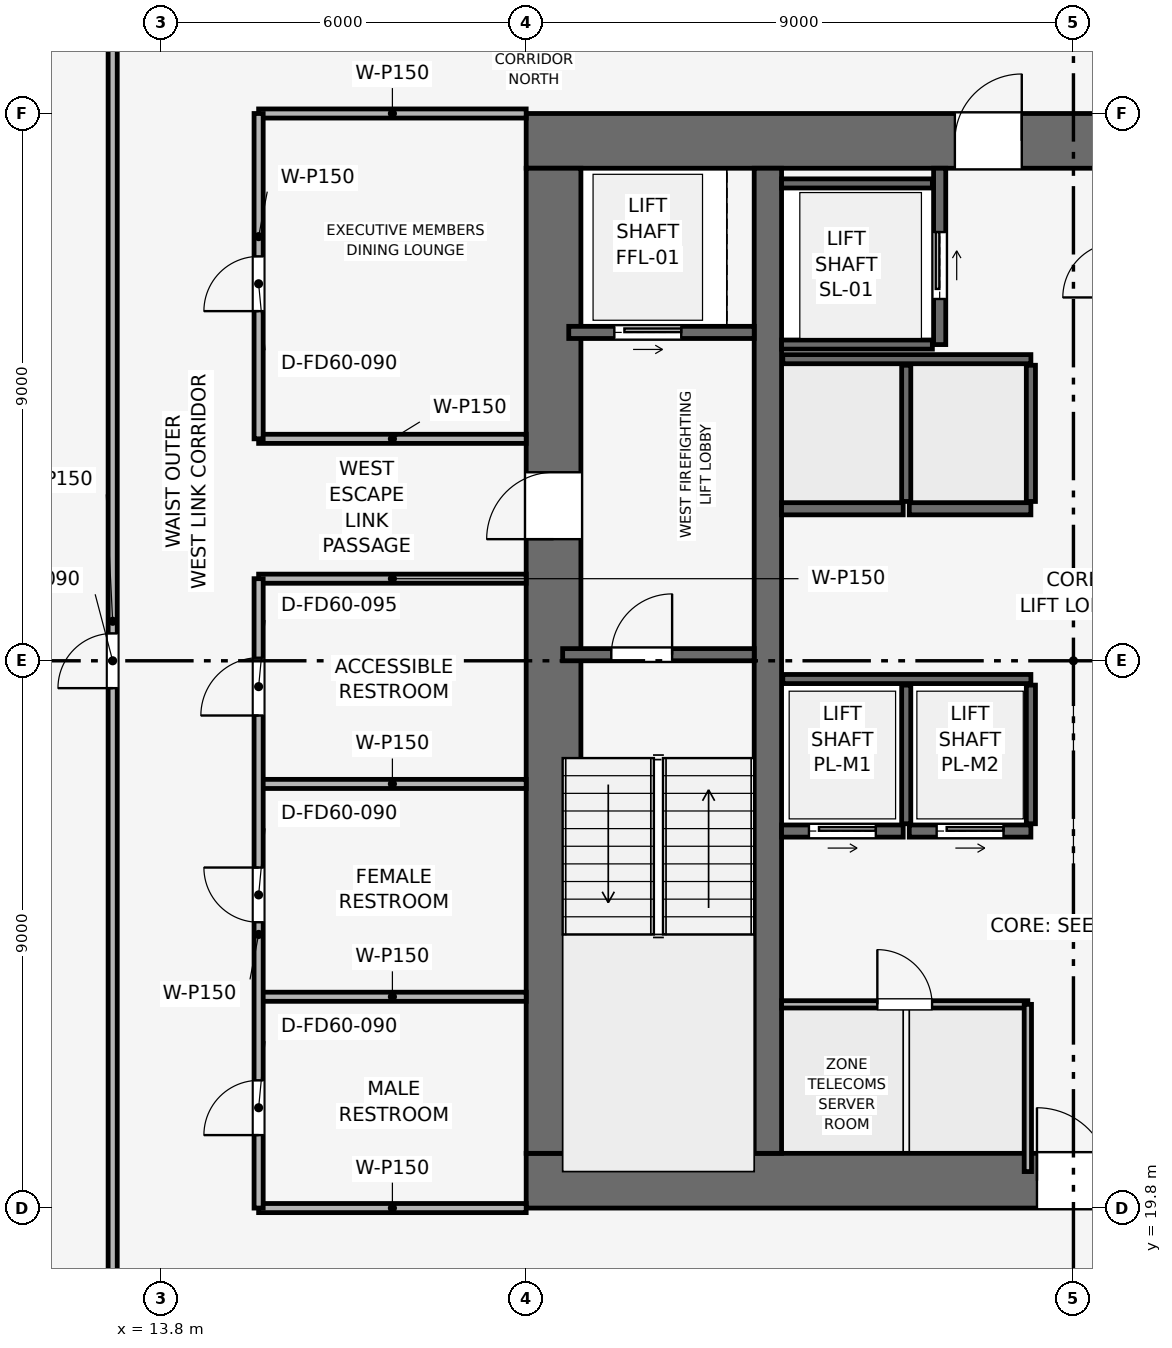
"""IFC4 building model, lengths in metres.
Left out: names, types, materials, properties, quantities, classifications, styles, units other than length and angle.
Written with IfcOpenShell. Run it as: python <this file> out.ifc"""

import sys

from ifc_helpers import new_model, si_unit, direction, frame, frame_2d, origin, place, context, subcontext, project, spatial, rectangle, extrude, element, fill, save


model = new_model("IFC4")
c1 = context("Model", 3, precision=1e-05, world=origin(), true_north=direction((0.0, 1.0)))
c2 = subcontext(c1, "Body", "Model", "MODEL_VIEW")
j1 = project(units=[si_unit("LENGTHUNIT", "METRE"), si_unit("PLANEANGLEUNIT", "RADIAN")], contexts=[c1])
p1 = place(None, origin())
s1 = spatial("IfcSite", under=j1, at=p1, CompositionType="ELEMENT")
p2 = place(p1, origin())
s2 = spatial("IfcBuilding", under=s1, at=p2, CompositionType="ELEMENT")
p3 = place(p2, frame((0.0, 0.0, 168.3)))
s3 = spatial("IfcBuildingStorey", under=s2, at=p3, CompositionType="ELEMENT", Elevation=168.3)
p4 = place(p3, frame((19.8, 20.25, 0.0), z_axis=(0.0, 0.0, 1.0), x_axis=(1.0, 0.0, 0.0)))
e1 = element("IfcWall", 1, at=p4, inside=s3, PredefinedType="SHEAR", context=c2, shape_type="SweptSolid", body=[
    extrude(rectangle(XDim=18.0, YDim=0.9, at=frame_2d((9.0, 0.0))), origin(), (0.0, 0.0, 1.0), 3.75),
])
p5 = place(p4, frame((8.4, 0.0, 0.0)))
e2 = element("IfcOpeningElement", 2, at=p5, cuts=e1, PredefinedType="OPENING", context=c2, shape_type="SweptSolid", body=[
    extrude(rectangle(XDim=1.2, YDim=2.2, at=frame_2d((0.6, 1.1))), frame((0.0, 0.46, 0.0), z_axis=(0.0, -1.0, 0.0), x_axis=(1.0, 0.0, 0.0)), (0.0, 0.0, 1.0), 0.92),
])
p6 = place(p3, frame((19.8, 37.35, 0.0), z_axis=(0.0, 0.0, 1.0), x_axis=(1.0, 0.0, 0.0)))
e3 = element("IfcWall", 3, at=p6, inside=s3, PredefinedType="SHEAR", context=c2, shape_type="SweptSolid", body=[
    extrude(rectangle(XDim=18.0, YDim=0.9, at=frame_2d((9.0, 0.0))), origin(), (0.0, 0.0, 1.0), 3.75),
])
p7 = place(p6, frame((7.05, 0.0, 0.0)))
e4 = element("IfcOpeningElement", 4, at=p7, cuts=e3, PredefinedType="OPENING", context=c2, shape_type="SweptSolid", body=[
    extrude(rectangle(XDim=1.1, YDim=2.15, at=frame_2d((0.55, 1.075))), frame((0.0, 0.46, 0.0), z_axis=(0.0, -1.0, 0.0), x_axis=(1.0, 0.0, 0.0)), (0.0, 0.0, 1.0), 0.92),
])
p8 = place(p3, frame((20.25, 20.7, 0.0), z_axis=(0.0, 0.0, 1.0), x_axis=(0.0, 1.0, 0.0)))
e5 = element("IfcWall", 5, at=p8, inside=s3, PredefinedType="SHEAR", context=c2, shape_type="SweptSolid", body=[
    extrude(rectangle(XDim=16.2, YDim=0.9, at=frame_2d((8.1, 0.0))), origin(), (0.0, 0.0, 1.0), 3.75),
])
p9 = place(p8, frame((10.1, 0.0, 0.0)))
e6 = element("IfcOpeningElement", 6, at=p9, cuts=e5, PredefinedType="OPENING", context=c2, shape_type="SweptSolid", body=[
    extrude(rectangle(XDim=1.1, YDim=2.15, at=frame_2d((0.55, 1.075))), frame((0.0, 0.46, 0.0), z_axis=(0.0, -1.0, 0.0), x_axis=(1.0, 0.0, 0.0)), (0.0, 0.0, 1.0), 0.92),
])
p10 = place(p3, frame((23.775, 20.7, 0.0), z_axis=(0.0, 0.0, 1.0), x_axis=(0.0, 1.0, 0.0)))
e7 = element("IfcWall", 7, at=p10, inside=s3, PredefinedType="SHEAR", context=c2, shape_type="SweptSolid", body=[
    extrude(rectangle(XDim=16.2, YDim=0.45, at=frame_2d((8.1, 0.0))), origin(), (0.0, 0.0, 1.0), 3.75),
])
p11 = place(p3, frame((20.4, 28.9, 0.0), z_axis=(0.0, 0.0, 1.0), x_axis=(1.0, 0.0, 0.0)))
e8 = element("IfcWall", 8, at=p11, inside=s3, PredefinedType="SHEAR", context=c2, shape_type="SweptSolid", body=[
    extrude(rectangle(XDim=3.15, YDim=0.2, at=frame_2d((1.575, 0.0))), origin(), (0.0, 0.0, 1.0), 3.495),
])
p12 = place(p11, frame((0.8, 0.0, 0.0)))
e9 = element("IfcOpeningElement", 9, at=p12, cuts=e8, PredefinedType="OPENING", context=c2, shape_type="SweptSolid", body=[
    extrude(rectangle(XDim=1.0, YDim=2.1, at=frame_2d((0.5, 1.05))), frame((0.0, 0.11, 0.0), z_axis=(0.0, -1.0, 0.0), x_axis=(1.0, 0.0, 0.0)), (0.0, 0.0, 1.0), 0.22),
])
p13 = place(p3, frame((20.5, 34.2, 0.0), z_axis=(0.0, 0.0, 1.0), x_axis=(1.0, 0.0, 0.0)))
e10 = element("IfcWall", 10, at=p13, inside=s3, PredefinedType="SHEAR", context=c2, shape_type="SweptSolid", body=[
    extrude(rectangle(XDim=3.05, YDim=0.2, at=frame_2d((1.525, 0.0))), origin(), (0.0, 0.0, 1.0), 3.495),
])
p14 = place(p13, frame((0.75, 0.0, 0.0)))
e11 = element("IfcOpeningElement", 11, at=p14, cuts=e10, PredefinedType="OPENING", context=c2, shape_type="SweptSolid", body=[
    extrude(rectangle(XDim=1.1, YDim=2.15, at=frame_2d((0.55, 1.075))), frame((0.0, 0.11, 0.0), z_axis=(0.0, -1.0, 0.0), x_axis=(1.0, 0.0, 0.0)), (0.0, 0.0, 1.0), 0.22),
])
p15 = place(p3, frame((26.6, 34.0, 0.0), z_axis=(0.0, 0.0, 1.0), x_axis=(0.0, 1.0, 0.0)))
e12 = element("IfcWall", 12, at=p15, inside=s3, PredefinedType="SHEAR", context=c2, shape_type="SweptSolid", body=[
    extrude(rectangle(XDim=2.9, YDim=0.2, at=frame_2d((1.45, 0.0))), origin(), (0.0, 0.0, 1.0), 3.495),
])
p16 = place(p15, frame((0.75, 0.0, 0.0)))
e13 = element("IfcOpeningElement", 13, at=p16, cuts=e12, PredefinedType="OPENING", context=c2, shape_type="SweptSolid", body=[
    extrude(rectangle(XDim=1.1, YDim=2.15, at=frame_2d((0.55, 1.075))), frame((0.0, 0.11, 0.0), z_axis=(0.0, -1.0, 0.0), x_axis=(1.0, 0.0, 0.0)), (0.0, 0.0, 1.0), 0.22),
])
for number, where, z_axis, x_axis in (
    (14, (24.0, 34.0, 0.0), (0.0, 0.0, 1.0), (1.0, 0.0, 0.0)),
    (15, (24.0, 36.65, 0.0), (0.0, 0.0, 1.0), (1.0, 0.0, 0.0)),
):
    element("IfcWall", number, at=place(p3, frame(where, z_axis=z_axis, x_axis=x_axis)), inside=s3, PredefinedType="SHEAR", context=c2, shape_type="SweptSolid", body=[
        extrude(rectangle(XDim=2.48, YDim=0.15, at=frame_2d((1.24, 0.0))), origin(), (0.0, 0.0, 1.0), 3.495),
    ])
p17 = place(p3, frame((24.0, 26.0, 0.0), z_axis=(0.0, 0.0, 1.0), x_axis=(1.0, 0.0, 0.0)))
e16 = element("IfcWall", 16, at=p17, inside=s3, PredefinedType="SHEAR", context=c2, shape_type="SweptSolid", body=[
    extrude(rectangle(XDim=2.0, YDim=0.2, at=frame_2d((1.0, 0.0))), origin(), (0.0, 0.0, 1.0), 3.495),
])
p18 = place(p17, frame((0.45, 0.0, 0.0)))
e17 = element("IfcOpeningElement", 17, at=p18, cuts=e16, PredefinedType="OPENING", context=c2, shape_type="SweptSolid", body=[
    extrude(rectangle(XDim=1.1, YDim=2.15, at=frame_2d((0.55, 1.075))), frame((0.0, 0.11, 0.0), z_axis=(0.0, -1.0, 0.0), x_axis=(1.0, 0.0, 0.0)), (0.0, 0.0, 1.0), 0.22),
])
p19 = place(p3, frame((26.1, 26.0, 0.0), z_axis=(0.0, 0.0, 1.0), x_axis=(1.0, 0.0, 0.0)))
e18 = element("IfcWall", 18, at=p19, inside=s3, PredefinedType="SHEAR", context=c2, shape_type="SweptSolid", body=[
    extrude(rectangle(XDim=2.0, YDim=0.2, at=frame_2d((1.0, 0.0))), origin(), (0.0, 0.0, 1.0), 3.495),
])
p20 = place(p19, frame((0.45, 0.0, 0.0)))
e19 = element("IfcOpeningElement", 19, at=p20, cuts=e18, PredefinedType="OPENING", context=c2, shape_type="SweptSolid", body=[
    extrude(rectangle(XDim=1.1, YDim=2.15, at=frame_2d((0.55, 1.075))), frame((0.0, 0.11, 0.0), z_axis=(0.0, -1.0, 0.0), x_axis=(1.0, 0.0, 0.0)), (0.0, 0.0, 1.0), 0.22),
])
for number, where, z_axis, x_axis in (
    (20, (24.0, 31.3, 0.0), (0.0, 0.0, 1.0), (1.0, 0.0, 0.0)),
    (21, (26.1, 31.3, 0.0), (0.0, 0.0, 1.0), (1.0, 0.0, 0.0)),
):
    element("IfcWall", number, at=place(p3, frame(where, z_axis=z_axis, x_axis=x_axis)), inside=s3, PredefinedType="SHEAR", context=c2, shape_type="SweptSolid", body=[
        extrude(rectangle(XDim=2.0, YDim=0.2, at=frame_2d((1.0, 0.0))), origin(), (0.0, 0.0, 1.0), 3.495),
    ])
p21 = place(p3, frame((24.02, 28.5, 0.0), z_axis=(0.0, 0.0, 1.0), x_axis=(1.0, 0.0, 0.0)))
e22 = element("IfcWall", 22, at=p21, inside=s3, PredefinedType="SHEAR", context=c2, shape_type="SweptSolid", body=[
    extrude(rectangle(XDim=4.08, YDim=0.15, at=frame_2d((2.04, 0.0))), origin(), (0.0, 0.0, 1.0), 3.495),
])
for number, where, z_axis, x_axis in (
    (23, (26.05, 26.12, 0.0), (0.0, 0.0, 1.0), (0.0, 1.0, 0.0)),
    (24, (28.1, 26.12, 0.0), (0.0, 0.0, 1.0), (0.0, 1.0, 0.0)),
):
    element("IfcWall", number, at=place(p3, frame(where, z_axis=z_axis, x_axis=x_axis)), inside=s3, PredefinedType="SHEAR", context=c2, shape_type="SweptSolid", body=[
        extrude(rectangle(XDim=2.28, YDim=0.15, at=frame_2d((1.14, 0.0))), origin(), (0.0, 0.0, 1.0), 3.495),
    ])
p22 = place(p3, frame((24.02, 33.76, 0.0), z_axis=(0.0, 0.0, 1.0), x_axis=(1.0, 0.0, 0.0)))
e25 = element("IfcWall", 25, at=p22, inside=s3, PredefinedType="SHEAR", context=c2, shape_type="SweptSolid", body=[
    extrude(rectangle(XDim=4.08, YDim=0.15, at=frame_2d((2.04, 0.0))), origin(), (0.0, 0.0, 1.0), 3.495),
])
for number, where, z_axis, x_axis in (
    (26, (26.05, 31.42, 0.0), (0.0, 0.0, 1.0), (0.0, 1.0, 0.0)),
    (27, (28.1, 31.42, 0.0), (0.0, 0.0, 1.0), (0.0, 1.0, 0.0)),
):
    element("IfcWall", number, at=place(p3, frame(where, z_axis=z_axis, x_axis=x_axis)), inside=s3, PredefinedType="SHEAR", context=c2, shape_type="SweptSolid", body=[
        extrude(rectangle(XDim=2.24, YDim=0.15, at=frame_2d((1.12, 0.0))), origin(), (0.0, 0.0, 1.0), 3.495),
    ])
p23 = place(p3, frame((24.0, 23.15, 0.0), z_axis=(0.0, 0.0, 1.0), x_axis=(1.0, 0.0, 0.0)))
e28 = element("IfcWall", 28, at=p23, inside=s3, PredefinedType="PARTITIONING", context=c2, shape_type="SweptSolid", body=[
    extrude(rectangle(XDim=4.05, YDim=0.12, at=frame_2d((2.025, 0.0))), origin(), (0.0, 0.0, 1.0), 3.495),
])
p24 = place(p23, frame((1.575, 0.0, 0.0)))
e29 = element("IfcOpeningElement", 29, at=p24, cuts=e28, PredefinedType="OPENING", context=c2, shape_type="SweptSolid", body=[
    extrude(rectangle(XDim=0.9, YDim=2.1, at=frame_2d((0.45, 1.05))), frame((0.0, 0.07, 0.0), z_axis=(0.0, -1.0, 0.0), x_axis=(1.0, 0.0, 0.0)), (0.0, 0.0, 1.0), 0.14),
])
p25 = place(p3, frame((28.05, 20.4, 0.0), z_axis=(0.0, 0.0, 1.0), x_axis=(0.0, 1.0, 0.0)))
e30 = element("IfcWall", 30, at=p25, inside=s3, PredefinedType="PARTITIONING", context=c2, shape_type="SweptSolid", body=[
    extrude(rectangle(XDim=2.75, YDim=0.12, at=frame_2d((1.375, 0.0))), origin(), (0.0, 0.0, 1.0), 3.495),
])
p26 = place(p3, frame((15.4, 19.8, 0.0), z_axis=(0.0, 0.0, 1.0), x_axis=(1.0, 0.0, 0.0)))
e31 = element("IfcWall", 31, at=p26, inside=s3, PredefinedType="PARTITIONING", context=c2, shape_type="SweptSolid", body=[
    extrude(rectangle(XDim=4.4, YDim=0.15, at=frame_2d((2.2, 0.0))), origin(), (0.0, 0.0, 1.0), 3.03),
])
for number, where, z_axis, x_axis in (
    (32, (15.4, 23.275, 0.0), (0.0, 0.0, 1.0), (1.0, 0.0, 0.0)),
    (33, (15.4, 26.775, 0.0), (0.0, 0.0, 1.0), (1.0, 0.0, 0.0)),
    (34, (15.4, 30.15, 0.0), (0.0, 0.0, 1.0), (1.0, 0.0, 0.0)),
    (35, (15.4, 32.45, 0.0), (0.0, 0.0, 1.0), (1.0, 0.0, 0.0)),
):
    element("IfcWall", number, at=place(p3, frame(where, z_axis=z_axis, x_axis=x_axis)), inside=s3, PredefinedType="PARTITIONING", context=c2, shape_type="SweptSolid", body=[
        extrude(rectangle(XDim=4.4, YDim=0.15, at=frame_2d((2.2, 0.0))), origin(), (0.0, 0.0, 1.0), 3.495),
    ])
p27 = place(p3, frame((15.4, 37.8, 0.0), z_axis=(0.0, 0.0, 1.0), x_axis=(1.0, 0.0, 0.0)))
e36 = element("IfcWall", 36, at=p27, inside=s3, PredefinedType="PARTITIONING", context=c2, shape_type="SweptSolid", body=[
    extrude(rectangle(XDim=4.4, YDim=0.15, at=frame_2d((2.2, 0.0))), origin(), (0.0, 0.0, 1.0), 3.03),
])
p28 = place(p3, frame((15.4, 19.8, 0.0), z_axis=(0.0, 0.0, 1.0), x_axis=(0.0, 1.0, 0.0)))
e37 = element("IfcWall", 37, at=p28, inside=s3, PredefinedType="PARTITIONING", context=c2, shape_type="SweptSolid", body=[
    extrude(rectangle(XDim=10.35, YDim=0.15, at=frame_2d((5.175, 0.0))), origin(), (0.0, 0.0, 1.0), 3.03),
])
p29 = place(p28, frame((1.2, 0.0, 0.0)))
e38 = element("IfcOpeningElement", 38, at=p29, cuts=e37, PredefinedType="OPENING", context=c2, shape_type="SweptSolid", body=[
    extrude(rectangle(XDim=0.9, YDim=2.1, at=frame_2d((0.45, 1.05))), frame((0.0, 0.085, 0.0), z_axis=(0.0, -1.0, 0.0), x_axis=(1.0, 0.0, 0.0)), (0.0, 0.0, 1.0), 0.17),
])
p30 = place(p28, frame((4.7, 0.0, 0.0)))
e39 = element("IfcOpeningElement", 39, at=p30, cuts=e37, PredefinedType="OPENING", context=c2, shape_type="SweptSolid", body=[
    extrude(rectangle(XDim=0.9, YDim=2.1, at=frame_2d((0.45, 1.05))), frame((0.0, 0.085, 0.0), z_axis=(0.0, -1.0, 0.0), x_axis=(1.0, 0.0, 0.0)), (0.0, 0.0, 1.0), 0.17),
])
p31 = place(p28, frame((8.1, 0.0, 0.0)))
e40 = element("IfcOpeningElement", 40, at=p31, cuts=e37, PredefinedType="OPENING", context=c2, shape_type="SweptSolid", body=[
    extrude(rectangle(XDim=0.95, YDim=2.1, at=frame_2d((0.475, 1.05))), frame((0.0, 0.085, 0.0), z_axis=(0.0, -1.0, 0.0), x_axis=(1.0, 0.0, 0.0)), (0.0, 0.0, 1.0), 0.17),
])
p32 = place(p3, frame((15.4, 32.45, 0.0), z_axis=(0.0, 0.0, 1.0), x_axis=(0.0, 1.0, 0.0)))
e41 = element("IfcWall", 41, at=p32, inside=s3, PredefinedType="PARTITIONING", context=c2, shape_type="SweptSolid", body=[
    extrude(rectangle(XDim=5.35, YDim=0.15, at=frame_2d((2.675, 0.0))), origin(), (0.0, 0.0, 1.0), 3.03),
])
p33 = place(p32, frame((2.1, 0.0, 0.0)))
e42 = element("IfcOpeningElement", 42, at=p33, cuts=e41, PredefinedType="OPENING", context=c2, shape_type="SweptSolid", body=[
    extrude(rectangle(XDim=0.9, YDim=2.1, at=frame_2d((0.45, 1.05))), frame((0.0, 0.085, 0.0), z_axis=(0.0, -1.0, 0.0), x_axis=(1.0, 0.0, 0.0)), (0.0, 0.0, 1.0), 0.17),
])
p34 = place(p3, frame((13.0, 17.4, 0.0), z_axis=(0.0, 0.0, 1.0), x_axis=(0.0, 1.0, 0.0)))
e43 = element("IfcWall", 43, at=p34, inside=s3, PredefinedType="PARTITIONING", context=c2, shape_type="SweptSolid", body=[
    extrude(rectangle(XDim=22.8, YDim=0.15, at=frame_2d((11.4, 0.0))), origin(), (0.0, 0.0, 1.0), 3.03),
])
p35 = place(p34, frame((10.95, 0.0, 0.0)))
e44 = element("IfcOpeningElement", 44, at=p35, cuts=e43, PredefinedType="OPENING", context=c2, shape_type="SweptSolid", body=[
    extrude(rectangle(XDim=0.9, YDim=2.1, at=frame_2d((0.45, 1.05))), frame((0.0, 0.085, 0.0), z_axis=(0.0, -1.0, 0.0), x_axis=(1.0, 0.0, 0.0)), (0.0, 0.0, 1.0), 0.17),
])
p36 = place(p12, origin())
e45 = element("IfcDoor", 45, at=p36, inside=s3, OperationType="SINGLE_SWING_RIGHT", PredefinedType="DOOR", context=c2, shape_type="SweptSolid", body=[
    extrude(rectangle(XDim=1.0, YDim=2.1, at=frame_2d((0.5, 1.05))), frame((0.0, 0.025, 0.0), z_axis=(0.0, -1.0, 0.0), x_axis=(1.0, 0.0, 0.0)), (0.0, 0.0, 1.0), 0.05),
])
fill(e9, e45)
p37 = place(p14, origin())
e46 = element("IfcDoor", 46, at=p37, inside=s3, OperationType="SLIDING_TO_RIGHT", PredefinedType="DOOR", context=c2, shape_type="SweptSolid", body=[
    extrude(rectangle(XDim=1.1, YDim=2.15, at=frame_2d((0.55, 1.075))), frame((0.0, 0.025, 0.0), z_axis=(0.0, -1.0, 0.0), x_axis=(1.0, 0.0, 0.0)), (0.0, 0.0, 1.0), 0.05),
])
fill(e11, e46)
p38 = place(p16, origin())
e47 = element("IfcDoor", 47, at=p38, inside=s3, OperationType="SLIDING_TO_RIGHT", PredefinedType="DOOR", context=c2, shape_type="SweptSolid", body=[
    extrude(rectangle(XDim=1.1, YDim=2.15, at=frame_2d((0.55, 1.075))), frame((0.0, 0.025, 0.0), z_axis=(0.0, -1.0, 0.0), x_axis=(1.0, 0.0, 0.0)), (0.0, 0.0, 1.0), 0.05),
])
fill(e13, e47)
p39 = place(p18, origin())
e48 = element("IfcDoor", 48, at=p39, inside=s3, OperationType="SLIDING_TO_RIGHT", PredefinedType="DOOR", context=c2, shape_type="SweptSolid", body=[
    extrude(rectangle(XDim=1.1, YDim=2.15, at=frame_2d((0.55, 1.075))), frame((0.0, 0.025, 0.0), z_axis=(0.0, -1.0, 0.0), x_axis=(1.0, 0.0, 0.0)), (0.0, 0.0, 1.0), 0.05),
])
fill(e17, e48)
p40 = place(p20, origin())
e49 = element("IfcDoor", 49, at=p40, inside=s3, OperationType="SLIDING_TO_RIGHT", PredefinedType="DOOR", context=c2, shape_type="SweptSolid", body=[
    extrude(rectangle(XDim=1.1, YDim=2.15, at=frame_2d((0.55, 1.075))), frame((0.0, 0.025, 0.0), z_axis=(0.0, -1.0, 0.0), x_axis=(1.0, 0.0, 0.0)), (0.0, 0.0, 1.0), 0.05),
])
fill(e19, e49)
p41 = place(p24, origin())
e50 = element("IfcDoor", 50, at=p41, inside=s3, OperationType="SINGLE_SWING_LEFT", PredefinedType="DOOR", context=c2, shape_type="SweptSolid", body=[
    extrude(rectangle(XDim=0.9, YDim=2.1, at=frame_2d((0.45, 1.05))), frame((0.0, 0.025, 0.0), z_axis=(0.0, -1.0, 0.0), x_axis=(1.0, 0.0, 0.0)), (0.0, 0.0, 1.0), 0.05),
])
fill(e29, e50)
p42 = place(p29, origin())
e51 = element("IfcDoor", 51, at=p42, inside=s3, OperationType="SINGLE_SWING_LEFT", PredefinedType="DOOR", context=c2, shape_type="SweptSolid", body=[
    extrude(rectangle(XDim=0.9, YDim=2.1, at=frame_2d((0.45, 1.05))), frame((0.0, 0.025, 0.0), z_axis=(0.0, -1.0, 0.0), x_axis=(1.0, 0.0, 0.0)), (0.0, 0.0, 1.0), 0.05),
])
fill(e38, e51)
p43 = place(p30, origin())
e52 = element("IfcDoor", 52, at=p43, inside=s3, OperationType="SINGLE_SWING_RIGHT", PredefinedType="DOOR", context=c2, shape_type="SweptSolid", body=[
    extrude(rectangle(XDim=0.9, YDim=2.1, at=frame_2d((0.45, 1.05))), frame((0.0, 0.025, 0.0), z_axis=(0.0, -1.0, 0.0), x_axis=(1.0, 0.0, 0.0)), (0.0, 0.0, 1.0), 0.05),
])
fill(e39, e52)
p44 = place(p31, origin())
e53 = element("IfcDoor", 53, at=p44, inside=s3, OperationType="SINGLE_SWING_LEFT", PredefinedType="DOOR", context=c2, shape_type="SweptSolid", body=[
    extrude(rectangle(XDim=0.95, YDim=2.1, at=frame_2d((0.475, 1.05))), frame((0.0, 0.025, 0.0), z_axis=(0.0, -1.0, 0.0), x_axis=(1.0, 0.0, 0.0)), (0.0, 0.0, 1.0), 0.05),
])
fill(e40, e53)
p45 = place(p33, origin())
e54 = element("IfcDoor", 54, at=p45, inside=s3, OperationType="SINGLE_SWING_LEFT", PredefinedType="DOOR", context=c2, shape_type="SweptSolid", body=[
    extrude(rectangle(XDim=0.9, YDim=2.1, at=frame_2d((0.45, 1.05))), frame((0.0, 0.025, 0.0), z_axis=(0.0, -1.0, 0.0), x_axis=(1.0, 0.0, 0.0)), (0.0, 0.0, 1.0), 0.05),
])
fill(e42, e54)
p46 = place(p35, origin())
e55 = element("IfcDoor", 55, at=p46, inside=s3, OperationType="SINGLE_SWING_LEFT", PredefinedType="DOOR", context=c2, shape_type="SweptSolid", body=[
    extrude(rectangle(XDim=0.9, YDim=2.1, at=frame_2d((0.45, 1.05))), frame((0.0, 0.025, 0.0), z_axis=(0.0, -1.0, 0.0), x_axis=(1.0, 0.0, 0.0)), (0.0, 0.0, 1.0), 0.05),
])
fill(e44, e55)
p47 = place(p9, origin())
e56 = element("IfcDoor", 56, at=p47, inside=s3, OperationType="SINGLE_SWING_LEFT", PredefinedType="DOOR", context=c2, shape_type="SweptSolid", body=[
    extrude(rectangle(XDim=1.1, YDim=2.15, at=frame_2d((0.55, 1.075))), frame((0.0, 0.025, 0.0), z_axis=(0.0, -1.0, 0.0), x_axis=(1.0, 0.0, 0.0)), (0.0, 0.0, 1.0), 0.05),
])
fill(e6, e56)
p48 = place(p5, origin())
e57 = element("IfcDoor", 57, at=p48, inside=s3, OperationType="SINGLE_SWING_LEFT", PredefinedType="DOOR", context=c2, shape_type="SweptSolid", body=[
    extrude(rectangle(XDim=1.2, YDim=2.2, at=frame_2d((0.6, 1.1))), frame((0.0, 0.025, 0.0), z_axis=(0.0, -1.0, 0.0), x_axis=(1.0, 0.0, 0.0)), (0.0, 0.0, 1.0), 0.05),
])
fill(e2, e57)
p49 = place(p7, origin())
e58 = element("IfcDoor", 58, at=p49, inside=s3, OperationType="SINGLE_SWING_RIGHT", PredefinedType="DOOR", context=c2, shape_type="SweptSolid", body=[
    extrude(rectangle(XDim=1.1, YDim=2.15, at=frame_2d((0.55, 1.075))), frame((0.0, 0.025, 0.0), z_axis=(0.0, -1.0, 0.0), x_axis=(1.0, 0.0, 0.0)), (0.0, 0.0, 1.0), 0.05),
])
fill(e4, e58)
save(model, sys.argv[1])
